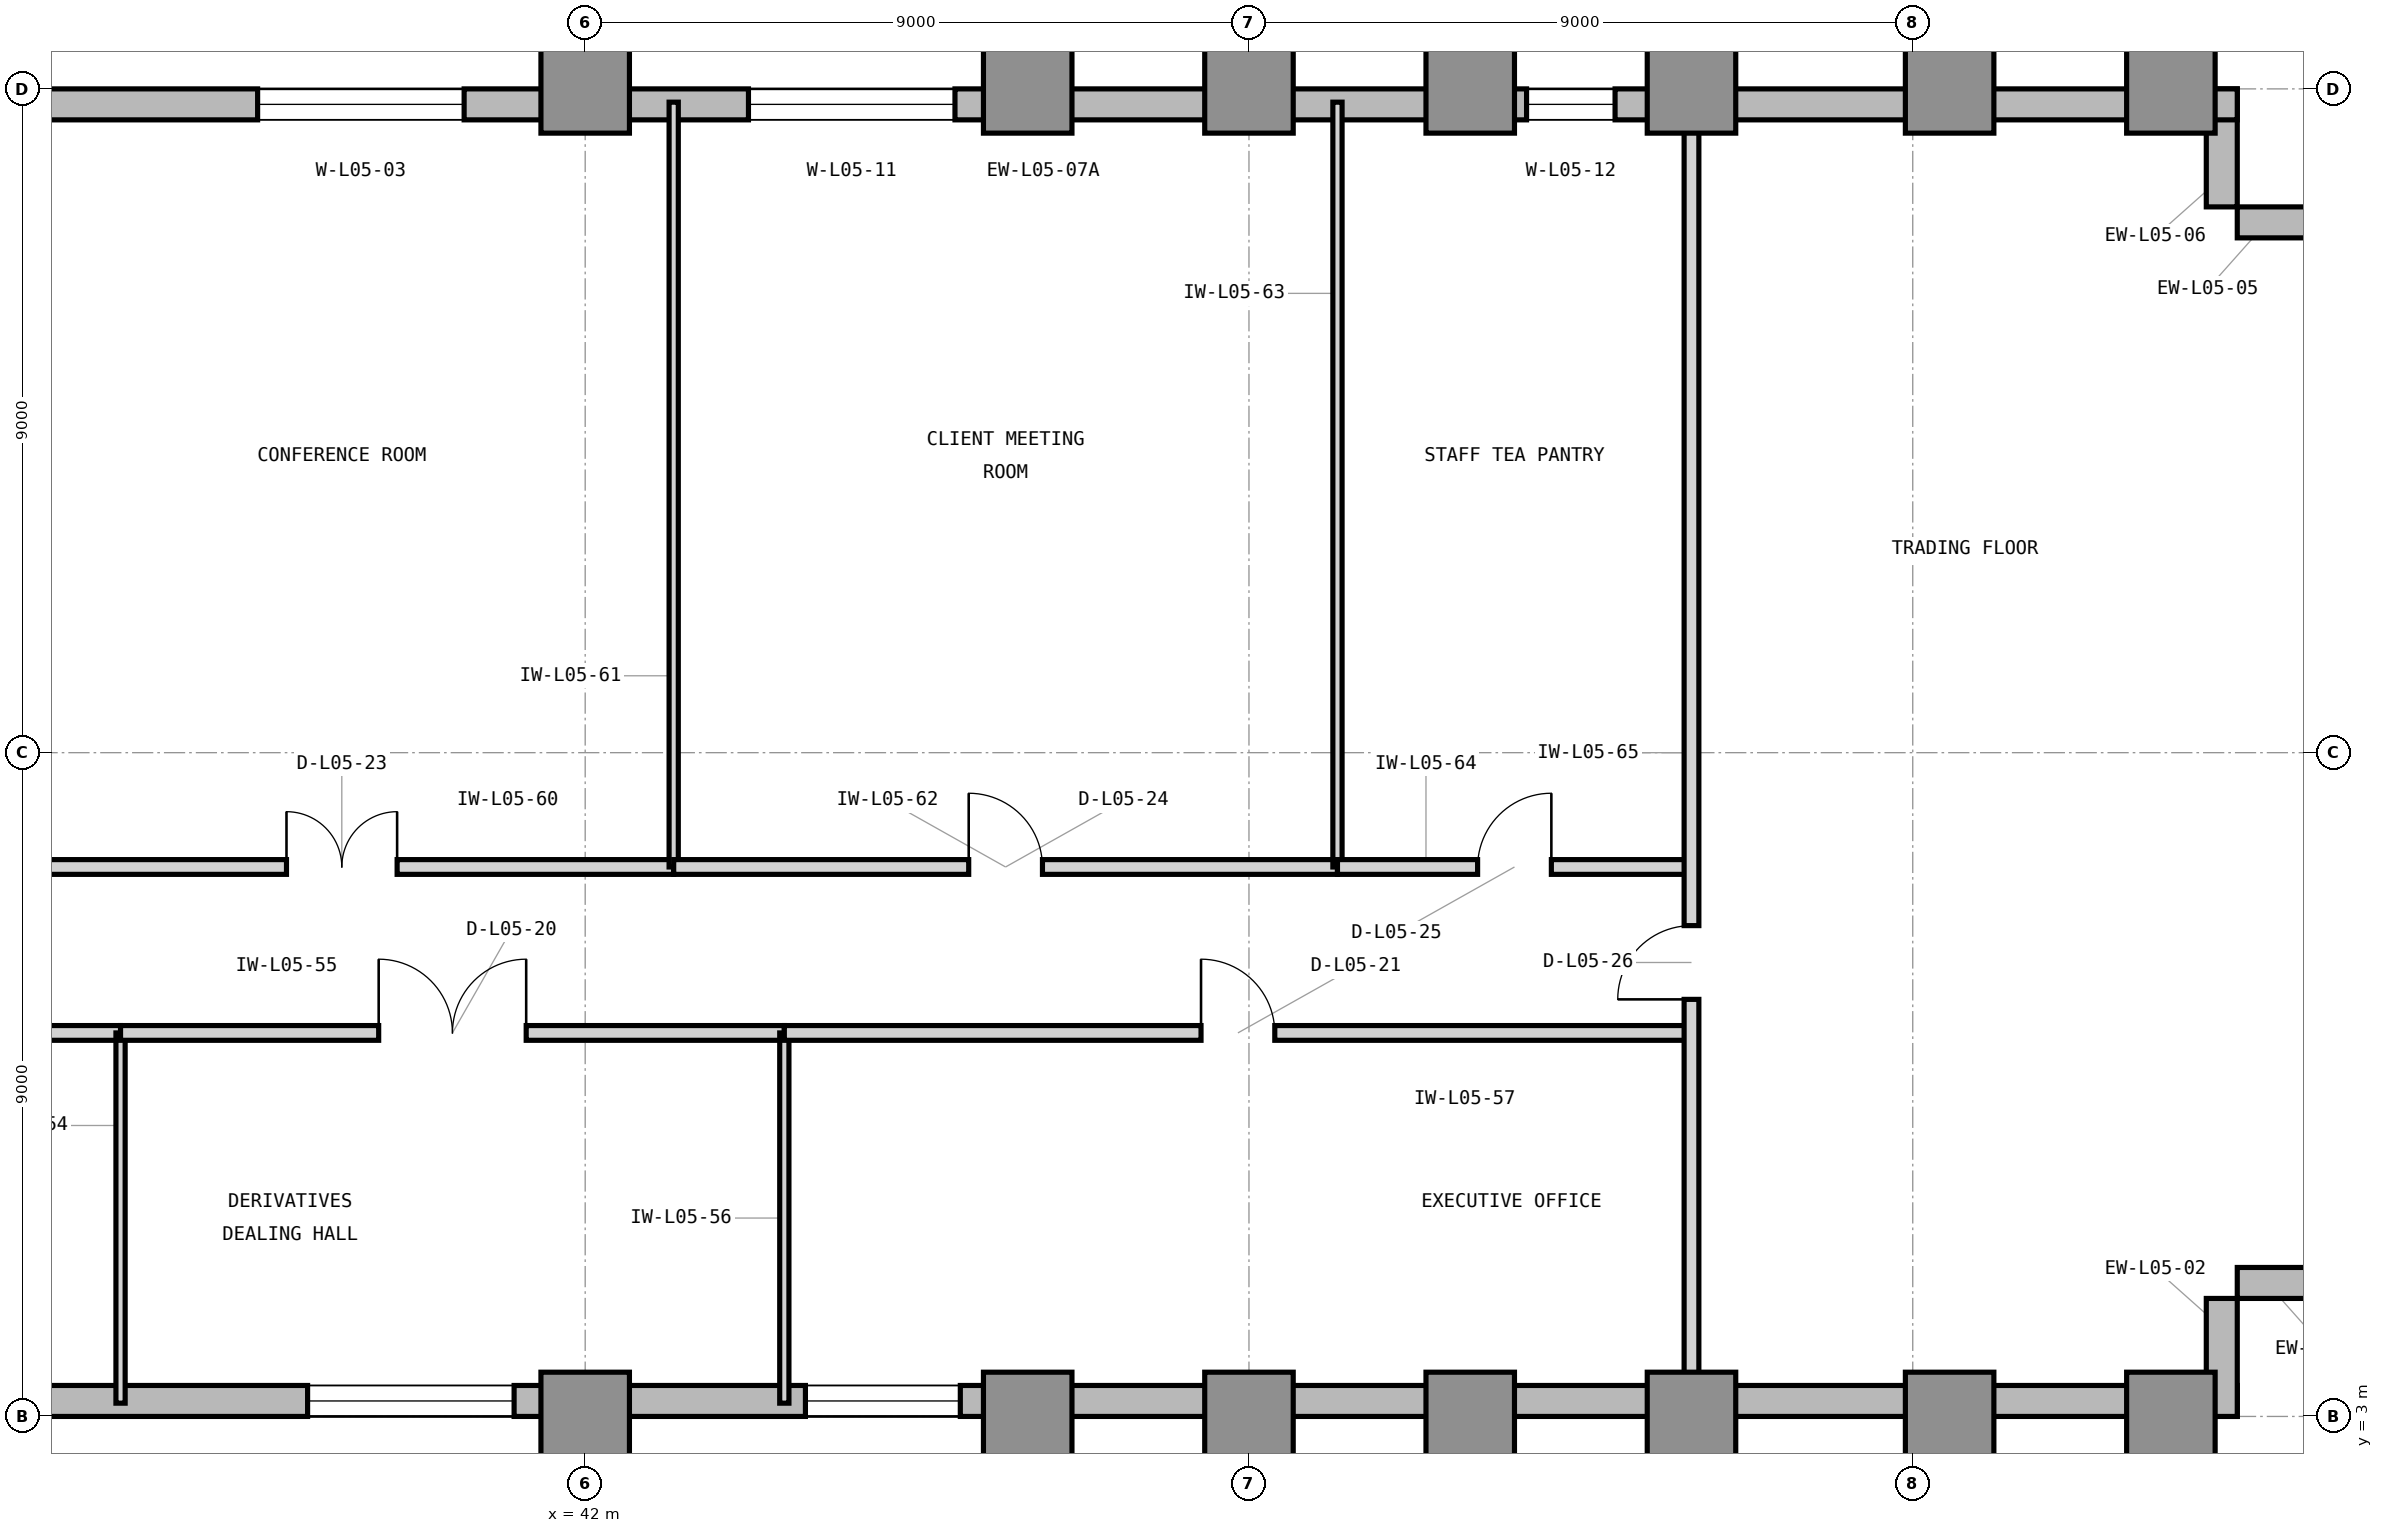
"""IFC4 building model, lengths in metres.
Left out: names, types, materials, properties, quantities, classifications, styles, units other than length and angle.
Written with IfcOpenShell. Run it as: python <this file> out.ifc"""

import sys

from ifc_helpers import new_model, si_unit, direction, frame, frame_2d, origin, origin_2d, place, context, subcontext, project, spatial, rectangle, extrude, element, fill, save


model = new_model("IFC4")
c1 = context("Model", 3, precision=1e-05, world=origin(), true_north=direction((0.0, 1.0)))
c2 = subcontext(c1, "Body", "Model", "MODEL_VIEW")
j1 = project(units=[si_unit("LENGTHUNIT", "METRE"), si_unit("PLANEANGLEUNIT", "RADIAN")], contexts=[c1])
p1 = place(None, origin())
s1 = spatial("IfcSite", under=j1, at=p1, CompositionType="ELEMENT")
p2 = place(p1, origin())
s2 = spatial("IfcBuilding", under=s1, at=p2, CompositionType="ELEMENT")
p3 = place(p2, frame((0.0, 0.0, 25.8)))
s3 = spatial("IfcBuildingStorey", under=s2, at=p3, CompositionType="ELEMENT", Elevation=25.8)
for number, where, z_axis, x_axis in (
    (1, (42.0, 3.0, 0.0), (0.0, 0.0, 1.0), (1.0, 0.0, 0.0)),
    (2, (42.0, 21.0, 0.0), (0.0, 0.0, 1.0), (1.0, 0.0, 0.0)),
    (3, (48.0, 3.0, 0.0), (0.0, 0.0, 1.0), (1.0, 0.0, 0.0)),
    (4, (48.0, 21.0, 0.0), (0.0, 0.0, 1.0), (1.0, 0.0, 0.0)),
    (5, (51.0, 3.0, 0.0), (0.0, 0.0, 1.0), (1.0, 0.0, 0.0)),
    (6, (51.0, 21.0, 0.0), (0.0, 0.0, 1.0), (1.0, 0.0, 0.0)),
    (7, (54.0, 3.0, 0.0), (0.0, 0.0, 1.0), (1.0, 0.0, 0.0)),
    (8, (54.0, 21.0, 0.0), (0.0, 0.0, 1.0), (1.0, 0.0, 0.0)),
    (9, (57.0, 3.0, 0.0), (0.0, 0.0, 1.0), (1.0, 0.0, 0.0)),
    (10, (57.0, 21.0, 0.0), (0.0, 0.0, 1.0), (1.0, 0.0, 0.0)),
    (11, (60.5, 3.0, 0.0), (0.0, 0.0, 1.0), (1.0, 0.0, 0.0)),
    (12, (60.5, 21.0, 0.0), (0.0, 0.0, 1.0), (1.0, 0.0, 0.0)),
    (13, (63.5, 3.0, 0.0), (0.0, 0.0, 1.0), (1.0, 0.0, 0.0)),
    (14, (63.5, 21.0, 0.0), (0.0, 0.0, 1.0), (1.0, 0.0, 0.0)),
):
    element("IfcColumn", number, at=place(p3, frame(where, z_axis=z_axis, x_axis=x_axis)), inside=s3, PredefinedType="COLUMN", context=c2, shape_type="SweptSolid", body=[
        extrude(rectangle(XDim=1.2, YDim=1.2, at=origin_2d()), origin(), (0.0, 0.0, 1.0), 4.2),
    ])
p4 = place(p3, frame((23.9, 3.21, 0.0), z_axis=(0.0, 0.0, 1.0), x_axis=(1.0, 0.0, 0.0)))
e15 = element("IfcWall", 15, at=p4, inside=s3, PredefinedType="STANDARD", context=c2, shape_type="SweptSolid", body=[
    extrude(rectangle(XDim=40.5, YDim=0.42, at=frame_2d((20.25, 0.0))), origin(), (0.0, 0.0, 1.0), 3.98),
])
p5 = place(p4, frame((1.1, 0.0, 0.85)))
e16 = element("IfcOpeningElement", 16, at=p5, cuts=e15, PredefinedType="OPENING", context=c2, shape_type="SweptSolid", body=[
    extrude(rectangle(XDim=1.2, YDim=2.45, at=frame_2d((0.6, 1.225))), frame((0.0, 0.22, 0.0), z_axis=(0.0, -1.0, 0.0), x_axis=(1.0, 0.0, 0.0)), (0.0, 0.0, 1.0), 0.44),
])
p6 = place(p4, frame((5.336, 0.0, 0.85)))
e17 = element("IfcOpeningElement", 17, at=p6, cuts=e15, PredefinedType="OPENING", context=c2, shape_type="SweptSolid", body=[
    extrude(rectangle(XDim=2.8, YDim=2.45, at=frame_2d((1.4, 1.225))), frame((0.0, 0.22, 0.0), z_axis=(0.0, -1.0, 0.0), x_axis=(1.0, 0.0, 0.0)), (0.0, 0.0, 1.0), 0.44),
])
p7 = place(p4, frame((14.336, 0.0, 0.85)))
e18 = element("IfcOpeningElement", 18, at=p7, cuts=e15, PredefinedType="OPENING", context=c2, shape_type="SweptSolid", body=[
    extrude(rectangle(XDim=2.8, YDim=2.45, at=frame_2d((1.4, 1.225))), frame((0.0, 0.22, 0.0), z_axis=(0.0, -1.0, 0.0), x_axis=(1.0, 0.0, 0.0)), (0.0, 0.0, 1.0), 0.44),
])
p8 = place(p4, frame((21.086, 0.0, 0.85)))
e19 = element("IfcOpeningElement", 19, at=p8, cuts=e15, PredefinedType="OPENING", context=c2, shape_type="SweptSolid", body=[
    extrude(rectangle(XDim=2.1, YDim=2.45, at=frame_2d((1.05, 1.225))), frame((0.0, 0.22, 0.0), z_axis=(0.0, -1.0, 0.0), x_axis=(1.0, 0.0, 0.0)), (0.0, 0.0, 1.0), 0.44),
])
for number, where, z_axis, x_axis in (
    (20, (64.19, 3.0, 0.0), (0.0, 0.0, 1.0), (0.0, 1.0, 0.0)),
    (21, (64.4, 4.81, 0.0), (0.0, 0.0, 1.0), (1.0, 0.0, 0.0)),
    (22, (66.0, 19.19, 0.0), (0.0, 0.0, 1.0), (-1.0, 0.0, 0.0)),
    (23, (64.19, 19.4, 0.0), (0.0, 0.0, 1.0), (0.0, 1.0, 0.0)),
):
    element("IfcWall", number, at=place(p3, frame(where, z_axis=z_axis, x_axis=x_axis)), inside=s3, PredefinedType="STANDARD", context=c2, shape_type="SweptSolid", body=[
        extrude(rectangle(XDim=1.6, YDim=0.42, at=frame_2d((0.8, 0.0))), origin(), (0.0, 0.0, 1.0), 3.98),
    ])
p9 = place(p3, frame((64.4, 20.79, 0.0), z_axis=(0.0, 0.0, 1.0), x_axis=(-1.0, 0.0, 0.0)))
e24 = element("IfcWall", 24, at=p9, inside=s3, PredefinedType="STANDARD", context=c2, shape_type="SweptSolid", body=[
    extrude(rectangle(XDim=32.38, YDim=0.42, at=frame_2d((16.19, 0.0))), origin(), (0.0, 0.0, 1.0), 3.98),
])
p10 = place(p9, frame((24.042, 0.0, 0.85)))
e25 = element("IfcOpeningElement", 25, at=p10, cuts=e24, PredefinedType="OPENING", context=c2, shape_type="SweptSolid", body=[
    extrude(rectangle(XDim=2.8, YDim=2.45, at=frame_2d((1.4, 1.225))), frame((0.0, 0.22, 0.0), z_axis=(0.0, -1.0, 0.0), x_axis=(1.0, 0.0, 0.0)), (0.0, 0.0, 1.0), 0.44),
])
p11 = place(p9, frame((17.386, 0.0, 0.85)))
e26 = element("IfcOpeningElement", 26, at=p11, cuts=e24, PredefinedType="OPENING", context=c2, shape_type="SweptSolid", body=[
    extrude(rectangle(XDim=2.8, YDim=2.45, at=frame_2d((1.4, 1.225))), frame((0.0, 0.22, 0.0), z_axis=(0.0, -1.0, 0.0), x_axis=(1.0, 0.0, 0.0)), (0.0, 0.0, 1.0), 0.44),
])
p12 = place(p9, frame((8.436, 0.0, 0.85)))
e27 = element("IfcOpeningElement", 27, at=p12, cuts=e24, PredefinedType="OPENING", context=c2, shape_type="SweptSolid", body=[
    extrude(rectangle(XDim=1.2, YDim=2.45, at=frame_2d((0.6, 1.225))), frame((0.0, 0.22, 0.0), z_axis=(0.0, -1.0, 0.0), x_axis=(1.0, 0.0, 0.0)), (0.0, 0.0, 1.0), 0.44),
])
p13 = place(p3, frame((26.7, 8.2, 0.0), z_axis=(0.0, 0.0, 1.0), x_axis=(1.0, 0.0, 0.0)))
e28 = element("IfcWall", 28, at=p13, inside=s3, PredefinedType="PARTITIONING", context=c2, shape_type="SweptSolid", body=[
    extrude(rectangle(XDim=9.0, YDim=0.2, at=frame_2d((4.5, 0.0))), origin(), (0.0, 0.0, 1.0), 3.97),
])
p14 = place(p13, frame((3.5, 0.0, 0.0)))
e29 = element("IfcOpeningElement", 29, at=p14, cuts=e28, PredefinedType="OPENING", context=c2, shape_type="SweptSolid", body=[
    extrude(rectangle(XDim=2.0, YDim=2.5, at=frame_2d((1.0, 1.25))), frame((0.0, 0.11, 0.0), z_axis=(0.0, -1.0, 0.0), x_axis=(1.0, 0.0, 0.0)), (0.0, 0.0, 1.0), 0.22),
])
p15 = place(p3, frame((35.7, 3.18, 0.0), z_axis=(0.0, 0.0, 1.0), x_axis=(0.0, 1.0, 0.0)))
e30 = element("IfcWall", 30, at=p15, inside=s3, PredefinedType="PARTITIONING", context=c2, shape_type="SweptSolid", body=[
    extrude(rectangle(XDim=5.02, YDim=0.125, at=frame_2d((2.51, 0.0))), origin(), (0.0, 0.0, 1.0), 3.97),
])
p16 = place(p3, frame((35.7, 8.2, 0.0), z_axis=(0.0, 0.0, 1.0), x_axis=(1.0, 0.0, 0.0)))
e31 = element("IfcWall", 31, at=p16, inside=s3, PredefinedType="PARTITIONING", context=c2, shape_type="SweptSolid", body=[
    extrude(rectangle(XDim=9.0, YDim=0.2, at=frame_2d((4.5, 0.0))), origin(), (0.0, 0.0, 1.0), 3.97),
])
p17 = place(p16, frame((3.5, 0.0, 0.0)))
e32 = element("IfcOpeningElement", 32, at=p17, cuts=e31, PredefinedType="OPENING", context=c2, shape_type="SweptSolid", body=[
    extrude(rectangle(XDim=2.0, YDim=2.5, at=frame_2d((1.0, 1.25))), frame((0.0, 0.11, 0.0), z_axis=(0.0, -1.0, 0.0), x_axis=(1.0, 0.0, 0.0)), (0.0, 0.0, 1.0), 0.22),
])
p18 = place(p3, frame((44.7, 3.18, 0.0), z_axis=(0.0, 0.0, 1.0), x_axis=(0.0, 1.0, 0.0)))
e33 = element("IfcWall", 33, at=p18, inside=s3, PredefinedType="PARTITIONING", context=c2, shape_type="SweptSolid", body=[
    extrude(rectangle(XDim=5.02, YDim=0.125, at=frame_2d((2.51, 0.0))), origin(), (0.0, 0.0, 1.0), 3.97),
])
p19 = place(p3, frame((44.7, 8.2, 0.0), z_axis=(0.0, 0.0, 1.0), x_axis=(1.0, 0.0, 0.0)))
e34 = element("IfcWall", 34, at=p19, inside=s3, PredefinedType="PARTITIONING", context=c2, shape_type="SweptSolid", body=[
    extrude(rectangle(XDim=12.3, YDim=0.2, at=frame_2d((6.15, 0.0))), origin(), (0.0, 0.0, 1.0), 3.97),
])
p20 = place(p19, frame((5.65, 0.0, 0.0)))
e35 = element("IfcOpeningElement", 35, at=p20, cuts=e34, PredefinedType="OPENING", context=c2, shape_type="SweptSolid", body=[
    extrude(rectangle(XDim=1.0, YDim=2.15, at=frame_2d((0.5, 1.075))), frame((0.0, 0.11, 0.0), z_axis=(0.0, -1.0, 0.0), x_axis=(1.0, 0.0, 0.0)), (0.0, 0.0, 1.0), 0.22),
])
p21 = place(p3, frame((34.2, 10.45, 0.0), z_axis=(0.0, 0.0, 1.0), x_axis=(1.0, 0.0, 0.0)))
e36 = element("IfcWall", 36, at=p21, inside=s3, PredefinedType="PARTITIONING", context=c2, shape_type="SweptSolid", body=[
    extrude(rectangle(XDim=9.0, YDim=0.2, at=frame_2d((4.5, 0.0))), origin(), (0.0, 0.0, 1.0), 3.97),
])
p22 = place(p21, frame((3.75, 0.0, 0.0)))
e37 = element("IfcOpeningElement", 37, at=p22, cuts=e36, PredefinedType="OPENING", context=c2, shape_type="SweptSolid", body=[
    extrude(rectangle(XDim=1.5, YDim=2.3, at=frame_2d((0.75, 1.15))), frame((0.0, 0.11, 0.0), z_axis=(0.0, -1.0, 0.0), x_axis=(1.0, 0.0, 0.0)), (0.0, 0.0, 1.0), 0.22),
])
p23 = place(p3, frame((43.2, 10.45, 0.0), z_axis=(0.0, 0.0, 1.0), x_axis=(0.0, 1.0, 0.0)))
e38 = element("IfcWall", 38, at=p23, inside=s3, PredefinedType="PARTITIONING", context=c2, shape_type="SweptSolid", body=[
    extrude(rectangle(XDim=10.37, YDim=0.125, at=frame_2d((5.185, 0.0))), origin(), (0.0, 0.0, 1.0), 3.97),
])
p24 = place(p3, frame((43.2, 10.45, 0.0), z_axis=(0.0, 0.0, 1.0), x_axis=(1.0, 0.0, 0.0)))
e39 = element("IfcWall", 39, at=p24, inside=s3, PredefinedType="PARTITIONING", context=c2, shape_type="SweptSolid", body=[
    extrude(rectangle(XDim=9.0, YDim=0.2, at=frame_2d((4.5, 0.0))), origin(), (0.0, 0.0, 1.0), 3.97),
])
p25 = place(p24, frame((4.0, 0.0, 0.0)))
e40 = element("IfcOpeningElement", 40, at=p25, cuts=e39, PredefinedType="OPENING", context=c2, shape_type="SweptSolid", body=[
    extrude(rectangle(XDim=1.0, YDim=2.15, at=frame_2d((0.5, 1.075))), frame((0.0, 0.11, 0.0), z_axis=(0.0, -1.0, 0.0), x_axis=(1.0, 0.0, 0.0)), (0.0, 0.0, 1.0), 0.22),
])
p26 = place(p3, frame((52.2, 10.45, 0.0), z_axis=(0.0, 0.0, 1.0), x_axis=(0.0, 1.0, 0.0)))
e41 = element("IfcWall", 41, at=p26, inside=s3, PredefinedType="PARTITIONING", context=c2, shape_type="SweptSolid", body=[
    extrude(rectangle(XDim=10.37, YDim=0.125, at=frame_2d((5.185, 0.0))), origin(), (0.0, 0.0, 1.0), 3.97),
])
p27 = place(p3, frame((52.2, 10.45, 0.0), z_axis=(0.0, 0.0, 1.0), x_axis=(1.0, 0.0, 0.0)))
e42 = element("IfcWall", 42, at=p27, inside=s3, PredefinedType="PARTITIONING", context=c2, shape_type="SweptSolid", body=[
    extrude(rectangle(XDim=4.8, YDim=0.2, at=frame_2d((2.4, 0.0))), origin(), (0.0, 0.0, 1.0), 3.97),
])
p28 = place(p27, frame((1.9, 0.0, 0.0)))
e43 = element("IfcOpeningElement", 43, at=p28, cuts=e42, PredefinedType="OPENING", context=c2, shape_type="SweptSolid", body=[
    extrude(rectangle(XDim=1.0, YDim=2.15, at=frame_2d((0.5, 1.075))), frame((0.0, 0.11, 0.0), z_axis=(0.0, -1.0, 0.0), x_axis=(1.0, 0.0, 0.0)), (0.0, 0.0, 1.0), 0.22),
])
p29 = place(p3, frame((57.0, 3.18, 0.0), z_axis=(0.0, 0.0, 1.0), x_axis=(0.0, 1.0, 0.0)))
e44 = element("IfcWall", 44, at=p29, inside=s3, PredefinedType="PARTITIONING", context=c2, shape_type="SweptSolid", body=[
    extrude(rectangle(XDim=17.64, YDim=0.2, at=frame_2d((8.82, 0.0))), origin(), (0.0, 0.0, 1.0), 3.114),
])
p30 = place(p29, frame((5.475, 0.0, 0.0)))
e45 = element("IfcOpeningElement", 45, at=p30, cuts=e44, PredefinedType="OPENING", context=c2, shape_type="SweptSolid", body=[
    extrude(rectangle(XDim=1.0, YDim=2.15, at=frame_2d((0.5, 1.075))), frame((0.0, 0.11, 0.0), z_axis=(0.0, -1.0, 0.0), x_axis=(1.0, 0.0, 0.0)), (0.0, 0.0, 1.0), 0.22),
])
p31 = place(p10, origin())
e46 = element("IfcWindow", 46, at=p31, inside=s3, PartitioningType="SINGLE_PANEL", PredefinedType="WINDOW", context=c2, shape_type="SweptSolid", body=[
    extrude(rectangle(XDim=2.8, YDim=2.45, at=frame_2d((1.4, 1.225))), frame((0.0, 0.11, 0.0), z_axis=(0.0, -1.0, 0.0), x_axis=(1.0, 0.0, 0.0)), (0.0, 0.0, 1.0), 0.06),
])
fill(e25, e46)
p32 = place(p17, origin())
e47 = element("IfcDoor", 47, at=p32, inside=s3, OperationType="DOUBLE_DOOR_SINGLE_SWING", PredefinedType="DOOR", context=c2, shape_type="SweptSolid", body=[
    extrude(rectangle(XDim=2.0, YDim=2.5, at=frame_2d((1.0, 1.25))), frame((0.0, 0.025, 0.0), z_axis=(0.0, -1.0, 0.0), x_axis=(1.0, 0.0, 0.0)), (0.0, 0.0, 1.0), 0.05),
])
fill(e32, e47)
p33 = place(p20, origin())
e48 = element("IfcDoor", 48, at=p33, inside=s3, OperationType="SINGLE_SWING_LEFT", PredefinedType="DOOR", context=c2, shape_type="SweptSolid", body=[
    extrude(rectangle(XDim=1.0, YDim=2.15, at=frame_2d((0.5, 1.075))), frame((0.0, 0.025, 0.0), z_axis=(0.0, -1.0, 0.0), x_axis=(1.0, 0.0, 0.0)), (0.0, 0.0, 1.0), 0.05),
])
fill(e35, e48)
p34 = place(p22, origin())
e49 = element("IfcDoor", 49, at=p34, inside=s3, OperationType="DOUBLE_DOOR_SINGLE_SWING", PredefinedType="DOOR", context=c2, shape_type="SweptSolid", body=[
    extrude(rectangle(XDim=1.5, YDim=2.3, at=frame_2d((0.75, 1.15))), frame((0.0, 0.025, 0.0), z_axis=(0.0, -1.0, 0.0), x_axis=(1.0, 0.0, 0.0)), (0.0, 0.0, 1.0), 0.05),
])
fill(e37, e49)
p35 = place(p25, origin())
e50 = element("IfcDoor", 50, at=p35, inside=s3, OperationType="SINGLE_SWING_LEFT", PredefinedType="DOOR", context=c2, shape_type="SweptSolid", body=[
    extrude(rectangle(XDim=1.0, YDim=2.15, at=frame_2d((0.5, 1.075))), frame((0.0, 0.025, 0.0), z_axis=(0.0, -1.0, 0.0), x_axis=(1.0, 0.0, 0.0)), (0.0, 0.0, 1.0), 0.05),
])
fill(e40, e50)
p36 = place(p28, origin())
e51 = element("IfcDoor", 51, at=p36, inside=s3, OperationType="SINGLE_SWING_RIGHT", PredefinedType="DOOR", context=c2, shape_type="SweptSolid", body=[
    extrude(rectangle(XDim=1.0, YDim=2.15, at=frame_2d((0.5, 1.075))), frame((0.0, 0.025, 0.0), z_axis=(0.0, -1.0, 0.0), x_axis=(1.0, 0.0, 0.0)), (0.0, 0.0, 1.0), 0.05),
])
fill(e43, e51)
p37 = place(p30, origin())
e52 = element("IfcDoor", 52, at=p37, inside=s3, OperationType="SINGLE_SWING_LEFT", PredefinedType="DOOR", context=c2, shape_type="SweptSolid", body=[
    extrude(rectangle(XDim=1.0, YDim=2.15, at=frame_2d((0.5, 1.075))), frame((0.0, 0.025, 0.0), z_axis=(0.0, -1.0, 0.0), x_axis=(1.0, 0.0, 0.0)), (0.0, 0.0, 1.0), 0.05),
])
fill(e45, e52)
p38 = place(p7, origin())
e53 = element("IfcWindow", 53, at=p38, inside=s3, PartitioningType="SINGLE_PANEL", PredefinedType="WINDOW", context=c2, shape_type="SweptSolid", body=[
    extrude(rectangle(XDim=2.8, YDim=2.45, at=frame_2d((1.4, 1.225))), frame((0.0, 0.11, 0.0), z_axis=(0.0, -1.0, 0.0), x_axis=(1.0, 0.0, 0.0)), (0.0, 0.0, 1.0), 0.06),
])
fill(e18, e53)
p39 = place(p8, origin())
e54 = element("IfcWindow", 54, at=p39, inside=s3, PartitioningType="SINGLE_PANEL", PredefinedType="WINDOW", context=c2, shape_type="SweptSolid", body=[
    extrude(rectangle(XDim=2.1, YDim=2.45, at=frame_2d((1.05, 1.225))), frame((0.0, 0.11, 0.0), z_axis=(0.0, -1.0, 0.0), x_axis=(1.0, 0.0, 0.0)), (0.0, 0.0, 1.0), 0.06),
])
fill(e19, e54)
p40 = place(p11, origin())
e55 = element("IfcWindow", 55, at=p40, inside=s3, PartitioningType="SINGLE_PANEL", PredefinedType="WINDOW", context=c2, shape_type="SweptSolid", body=[
    extrude(rectangle(XDim=2.8, YDim=2.45, at=frame_2d((1.4, 1.225))), frame((0.0, 0.11, 0.0), z_axis=(0.0, -1.0, 0.0), x_axis=(1.0, 0.0, 0.0)), (0.0, 0.0, 1.0), 0.06),
])
fill(e26, e55)
p41 = place(p12, origin())
e56 = element("IfcWindow", 56, at=p41, inside=s3, PartitioningType="SINGLE_PANEL", PredefinedType="WINDOW", context=c2, shape_type="SweptSolid", body=[
    extrude(rectangle(XDim=1.2, YDim=2.45, at=frame_2d((0.6, 1.225))), frame((0.0, 0.11, 0.0), z_axis=(0.0, -1.0, 0.0), x_axis=(1.0, 0.0, 0.0)), (0.0, 0.0, 1.0), 0.06),
])
fill(e27, e56)
save(model, sys.argv[1])
